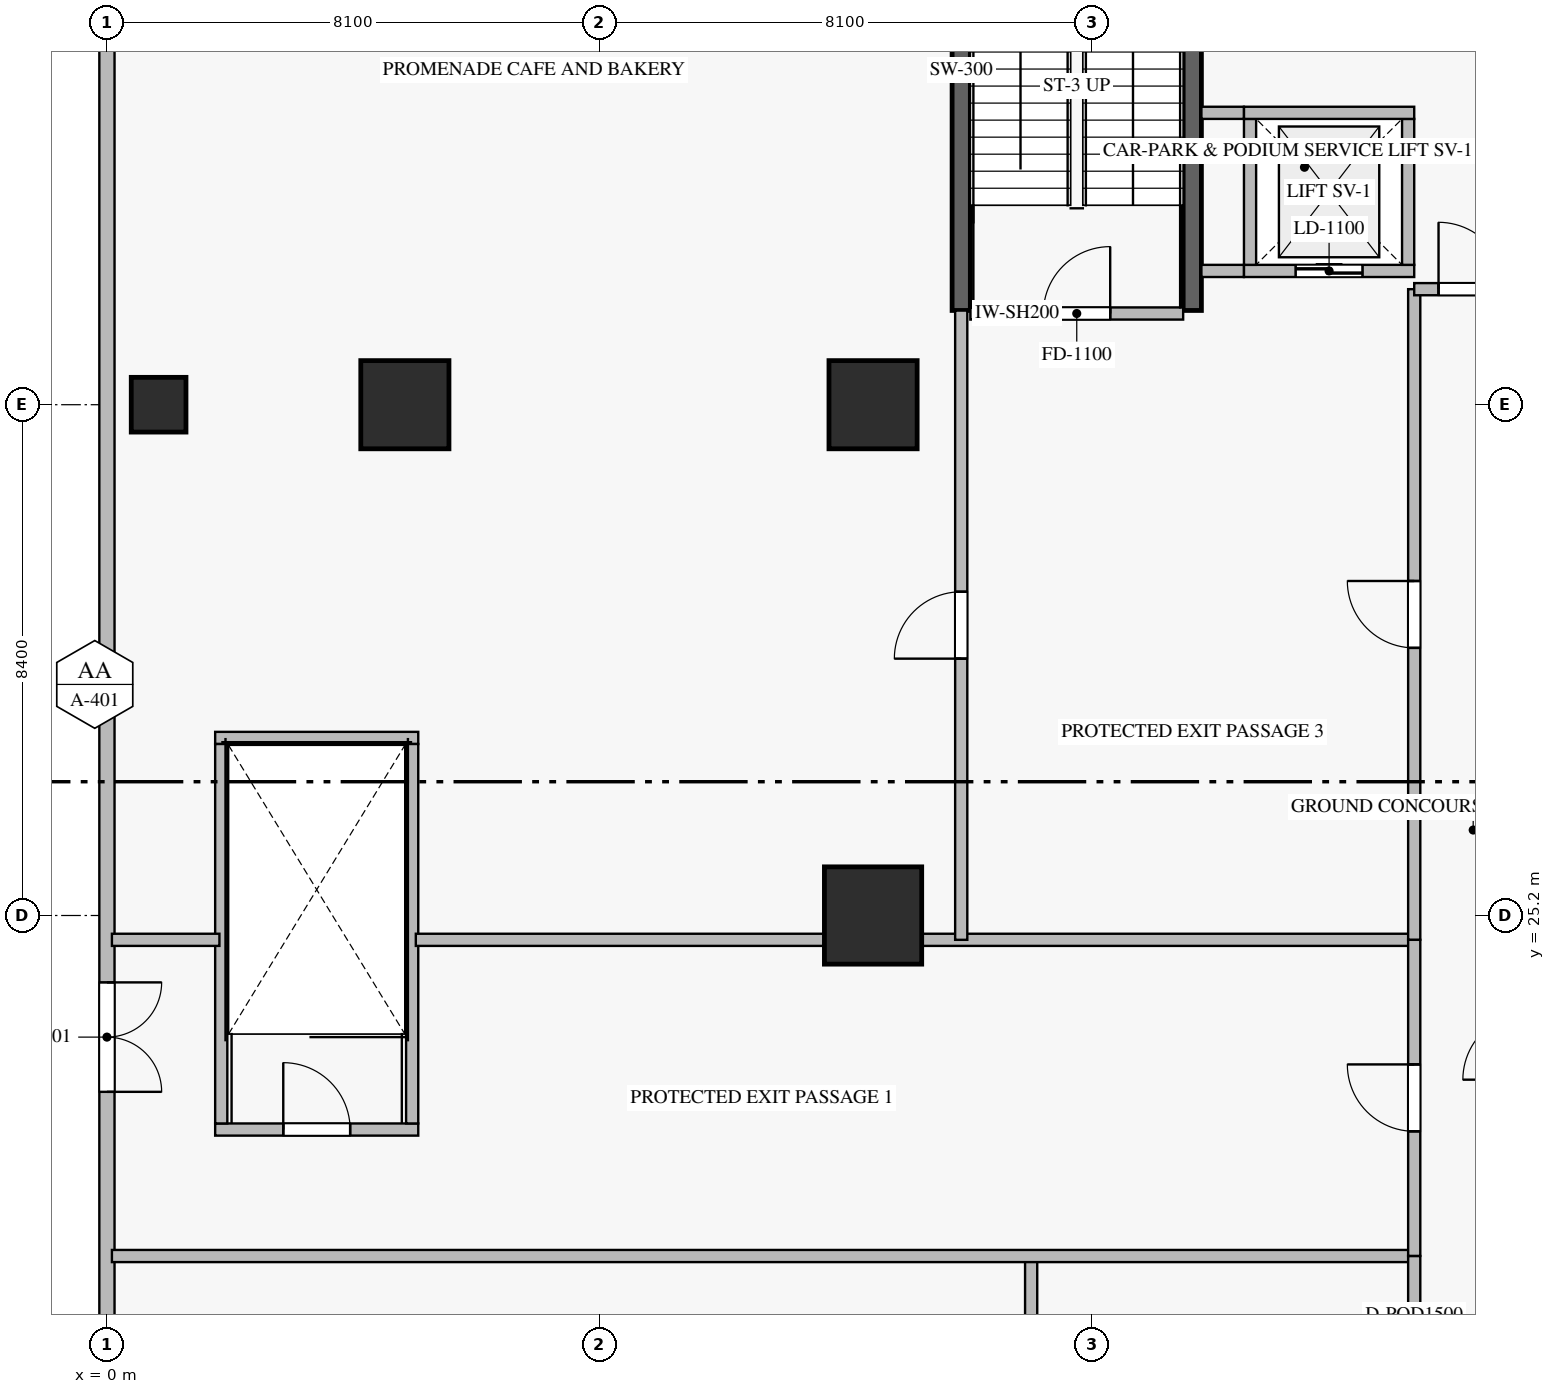
"""IFC4 building model, lengths in metres.
Left out: names, types, materials, properties, quantities, classifications, styles, units other than length and angle.
Written with IfcOpenShell. Run it as: python <this file> out.ifc"""

import sys

from ifc_helpers import new_model, si_unit, direction, frame, frame_2d, origin, origin_2d, place, context, subcontext, project, spatial, rectangle, extrude, source, transform, mapped, element, fill, save


model = new_model("IFC4")
c1 = context("Model", 3, precision=1e-05, world=origin(), true_north=direction((0.0, 1.0)))
c2 = subcontext(c1, "Body", "Model", "MODEL_VIEW")
j1 = project(units=[si_unit("LENGTHUNIT", "METRE"), si_unit("PLANEANGLEUNIT", "RADIAN")], contexts=[c1])
p1 = place(None, origin())
s1 = spatial("IfcSite", under=j1, at=p1, CompositionType="ELEMENT")
p2 = place(p1, origin())
s2 = spatial("IfcBuilding", under=s1, at=p2, CompositionType="ELEMENT")
p3 = place(p2, origin())
s3 = spatial("IfcBuildingStorey", under=s2, at=p3, CompositionType="ELEMENT", Elevation=0.0)
m1 = source(origin(), c2, "Body", "SweptSolid", [
    extrude(rectangle(XDim=0.9, YDim=0.9, at=origin_2d()), origin(), (0.0, 0.0, 1.0), 5.5),
])
p4 = place(p3, frame((0.85, 33.6, -0.38), z_axis=(0.0, 0.0, 1.0), x_axis=(1.0, 0.0, 0.0)))
e1 = element("IfcColumn", 1, at=p4, inside=s3, PredefinedType="COLUMN", context=c2, shape_type="MappedRepresentation", body=[
    mapped(m1, transform((0.0, 0.0, 0.0), scale=1.0)),
])
m2 = source(origin(), c2, "Body", "SweptSolid", [
    extrude(rectangle(XDim=1.6, YDim=1.6, at=origin_2d()), origin(), (0.0, 0.0, 1.0), 5.5),
])
p5 = place(p3, frame((12.6, 25.2, -0.38), z_axis=(0.0, 0.0, 1.0), x_axis=(1.0, 0.0, 0.0)))
e2 = element("IfcColumn", 2, at=p5, inside=s3, PredefinedType="COLUMN", context=c2, shape_type="MappedRepresentation", body=[
    mapped(m2, transform((0.0, 0.0, 0.0), scale=1.0)),
])
m3 = source(origin(), c2, "Body", "SweptSolid", [
    extrude(rectangle(XDim=1.45, YDim=1.45, at=origin_2d()), origin(), (0.0, 0.0, 1.0), 5.5),
])
for number, where, z_axis, x_axis in (
    (3, (12.6, 33.6, -0.38), (0.0, 0.0, 1.0), (1.0, 0.0, 0.0)),
    (4, (4.9, 33.6, -0.38), (0.0, 0.0, 1.0), (1.0, 0.0, 0.0)),
):
    element("IfcColumn", number, at=place(p3, frame(where, z_axis=z_axis, x_axis=x_axis)), inside=s3, PredefinedType="COLUMN", context=c2, shape_type="MappedRepresentation", body=[
        mapped(m3, transform((0.0, 0.0, 0.0), scale=1.0)),
    ])
p6 = place(p3, frame((0.0, 46.075, 0.0), z_axis=(0.0, 0.0, 1.0), x_axis=(0.0, -1.0, 0.0)))
e5 = element("IfcWall", 5, at=p6, inside=s3, PredefinedType="ELEMENTEDWALL", context=c2, shape_type="SweptSolid", body=[
    extrude(rectangle(XDim=41.75, YDim=0.25, at=frame_2d((20.875, 0.0))), origin(), (0.0, 0.0, 1.0), 5.105),
])
p7 = place(p6, frame((21.975, 0.0, 0.0)))
e6 = element("IfcOpeningElement", 6, at=p7, cuts=e5, PredefinedType="OPENING", context=c2, shape_type="SweptSolid", body=[
    extrude(rectangle(XDim=1.8, YDim=2.3, at=frame_2d((0.9, 1.15))), frame((0.0, 0.135, 0.0), z_axis=(0.0, -1.0, 0.0), x_axis=(1.0, 0.0, 0.0)), (0.0, 0.0, 1.0), 0.27),
])
p8 = place(p6, frame((33.475, 0.0, 0.0)))
e7 = element("IfcOpeningElement", 7, at=p8, cuts=e5, PredefinedType="OPENING", context=c2, shape_type="SweptSolid", body=[
    extrude(rectangle(XDim=1.8, YDim=2.3, at=frame_2d((0.9, 1.15))), frame((0.0, 0.135, 0.0), z_axis=(0.0, -1.0, 0.0), x_axis=(1.0, 0.0, 0.0)), (0.0, 0.0, 1.0), 0.27),
])
for number, where, z_axis, x_axis in (
    (8, (14.05, 35.15, -0.38), (0.0, 0.0, 1.0), (0.0, 1.0, 0.0)),
    (9, (17.85, 35.15, -0.38), (0.0, 0.0, 1.0), (0.0, 1.0, 0.0)),
):
    element("IfcWall", number, at=place(p3, frame(where, z_axis=z_axis, x_axis=x_axis)), inside=s3, PredefinedType="SHEAR", context=c2, shape_type="SweptSolid", body=[
        extrude(rectangle(XDim=7.9, YDim=0.3, at=frame_2d((3.95, 0.0))), origin(), (0.0, 0.0, 1.0), 5.498),
    ])
p9 = place(p3, frame((14.2, 35.1, 0.0), z_axis=(0.0, 0.0, 1.0), x_axis=(1.0, 0.0, 0.0)))
e10 = element("IfcWall", 10, at=p9, inside=s3, PredefinedType="STANDARD", context=c2, shape_type="SweptSolid", body=[
    extrude(rectangle(XDim=3.5, YDim=0.2, at=frame_2d((1.75, 0.0))), origin(), (0.0, 0.0, 1.0), 5.12),
])
p10 = place(p9, frame((1.2, 0.0, 0.0)))
e11 = element("IfcOpeningElement", 11, at=p10, cuts=e10, PredefinedType="OPENING", context=c2, shape_type="SweptSolid", body=[
    extrude(rectangle(XDim=1.1, YDim=2.15, at=frame_2d((0.55, 1.075))), frame((0.0, 0.11, 0.0), z_axis=(0.0, -1.0, 0.0), x_axis=(1.0, 0.0, 0.0)), (0.0, 0.0, 1.0), 0.22),
])
p11 = place(p3, frame((1.78, 21.68, 0.0), z_axis=(0.0, 0.0, 1.0), x_axis=(1.0, 0.0, 0.0)))
e12 = element("IfcWall", 12, at=p11, inside=s3, PredefinedType="STANDARD", context=c2, shape_type="SweptSolid", body=[
    extrude(rectangle(XDim=3.34, YDim=0.2, at=frame_2d((1.67, 0.0))), origin(), (0.0, 0.0, 1.0), 5.12),
])
p12 = place(p11, frame((1.12, 0.0, 0.0)))
e13 = element("IfcOpeningElement", 13, at=p12, cuts=e12, PredefinedType="OPENING", context=c2, shape_type="SweptSolid", body=[
    extrude(rectangle(XDim=1.1, YDim=2.15, at=frame_2d((0.55, 1.075))), frame((0.0, 0.11, 0.0), z_axis=(0.0, -1.0, 0.0), x_axis=(1.0, 0.0, 0.0)), (0.0, 0.0, 1.0), 0.22),
])
p13 = place(p3, frame((1.78, 28.12, 0.0), z_axis=(0.0, 0.0, 1.0), x_axis=(1.0, 0.0, 0.0)))
e14 = element("IfcWall", 14, at=p13, inside=s3, PredefinedType="STANDARD", context=c2, shape_type="SweptSolid", body=[
    extrude(rectangle(XDim=3.34, YDim=0.2, at=frame_2d((1.67, 0.0))), origin(), (0.0, 0.0, 1.0), 5.12),
])
for number, where, z_axis, x_axis in (
    (15, (1.88, 21.78, 0.0), (0.0, 0.0, 1.0), (0.0, 1.0, 0.0)),
    (16, (5.02, 21.78, 0.0), (0.0, 0.0, 1.0), (0.0, 1.0, 0.0)),
):
    element("IfcWall", number, at=place(p3, frame(where, z_axis=z_axis, x_axis=x_axis)), inside=s3, PredefinedType="STANDARD", context=c2, shape_type="SweptSolid", body=[
        extrude(rectangle(XDim=6.24, YDim=0.2, at=frame_2d((3.12, 0.0))), origin(), (0.0, 0.0, 1.0), 5.12),
    ])
p14 = place(p3, frame((18.7, 35.8, 0.0), z_axis=(0.0, 0.0, 1.0), x_axis=(1.0, 0.0, 0.0)))
e17 = element("IfcWall", 17, at=p14, inside=s3, PredefinedType="STANDARD", context=c2, shape_type="SweptSolid", body=[
    extrude(rectangle(XDim=2.8, YDim=0.2, at=frame_2d((1.4, 0.0))), origin(), (0.0, 0.0, 1.0), 5.12),
])
p15 = place(p14, frame((0.85, 0.0, 0.0)))
e18 = element("IfcOpeningElement", 18, at=p15, cuts=e17, PredefinedType="OPENING", context=c2, shape_type="SweptSolid", body=[
    extrude(rectangle(XDim=1.1, YDim=2.2, at=frame_2d((0.55, 1.1))), frame((0.0, 0.11, 0.0), z_axis=(0.0, -1.0, 0.0), x_axis=(1.0, 0.0, 0.0)), (0.0, 0.0, 1.0), 0.22),
])
for number, where, z_axis, x_axis in (
    (19, (18.8, 35.9, 0.0), (0.0, 0.0, 1.0), (0.0, 1.0, 0.0)),
    (20, (21.4, 35.9, 0.0), (0.0, 0.0, 1.0), (0.0, 1.0, 0.0)),
):
    element("IfcWall", number, at=place(p3, frame(where, z_axis=z_axis, x_axis=x_axis)), inside=s3, PredefinedType="STANDARD", context=c2, shape_type="SweptSolid", body=[
        extrude(rectangle(XDim=2.4, YDim=0.2, at=frame_2d((1.2, 0.0))), origin(), (0.0, 0.0, 1.0), 5.12),
    ])
p16 = place(p3, frame((18.7, 38.4, 0.0), z_axis=(0.0, 0.0, 1.0), x_axis=(1.0, 0.0, 0.0)))
e21 = element("IfcWall", 21, at=p16, inside=s3, PredefinedType="STANDARD", context=c2, shape_type="SweptSolid", body=[
    extrude(rectangle(XDim=2.8, YDim=0.2, at=frame_2d((1.4, 0.0))), origin(), (0.0, 0.0, 1.0), 5.12),
])
p17 = place(p3, frame((15.2, 4.282, 0.0), z_axis=(0.0, 0.0, 1.0), x_axis=(0.0, 1.0, 0.0)))
e22 = element("IfcWall", 22, at=p17, inside=s3, PredefinedType="STANDARD", context=c2, shape_type="SweptSolid", body=[
    extrude(rectangle(XDim=15.318, YDim=0.2, at=frame_2d((7.659, 0.0))), origin(), (0.0, 0.0, 1.0), 5.12),
])
p18 = place(p17, frame((7.209, 0.0, 0.0)))
e23 = element("IfcOpeningElement", 23, at=p18, cuts=e22, PredefinedType="OPENING", context=c2, shape_type="SweptSolid", body=[
    extrude(rectangle(XDim=0.9, YDim=2.1, at=frame_2d((0.45, 1.05))), frame((0.0, 0.11, 0.0), z_axis=(0.0, -1.0, 0.0), x_axis=(1.0, 0.0, 0.0)), (0.0, 0.0, 1.0), 0.22),
])
p19 = place(p3, frame((0.082, 19.6, 0.0), z_axis=(0.0, 0.0, 1.0), x_axis=(1.0, 0.0, 0.0)))
e24 = element("IfcWall", 24, at=p19, inside=s3, PredefinedType="STANDARD", context=c2, shape_type="SweptSolid", body=[
    extrude(rectangle(XDim=21.418, YDim=0.2, at=frame_2d((10.709, 0.0))), origin(), (0.0, 0.0, 1.0), 5.12),
])
p20 = place(p3, frame((0.082, 24.8, 0.0), z_axis=(0.0, 0.0, 1.0), x_axis=(1.0, 0.0, 0.0)))
e25 = element("IfcWall", 25, at=p20, inside=s3, PredefinedType="STANDARD", context=c2, shape_type="SweptSolid", body=[
    extrude(rectangle(XDim=1.768, YDim=0.2, at=frame_2d((0.884, 0.0))), origin(), (0.0, 0.0, 1.0), 5.12),
])
p21 = place(p3, frame((5.08, 24.8, 0.0), z_axis=(0.0, 0.0, 1.0), x_axis=(1.0, 0.0, 0.0)))
e26 = element("IfcWall", 26, at=p21, inside=s3, PredefinedType="STANDARD", context=c2, shape_type="SweptSolid", body=[
    extrude(rectangle(XDim=16.42, YDim=0.2, at=frame_2d((8.21, 0.0))), origin(), (0.0, 0.0, 1.0), 5.12),
])
p22 = place(p3, frame((21.5, 14.902, 0.0), z_axis=(0.0, 0.0, 1.0), x_axis=(0.0, 1.0, 0.0)))
e27 = element("IfcWall", 27, at=p22, inside=s3, PredefinedType="STANDARD", context=c2, shape_type="SweptSolid", body=[
    extrude(rectangle(XDim=4.698, YDim=0.2, at=frame_2d((2.349, 0.0))), origin(), (0.0, 0.0, 1.0), 5.12),
])
p23 = place(p22, frame((1.599, 0.0, 0.0)))
e28 = element("IfcOpeningElement", 28, at=p23, cuts=e27, PredefinedType="OPENING", context=c2, shape_type="SweptSolid", body=[
    extrude(rectangle(XDim=1.5, YDim=2.25, at=frame_2d((0.75, 1.125))), frame((0.0, 0.11, 0.0), z_axis=(0.0, -1.0, 0.0), x_axis=(1.0, 0.0, 0.0)), (0.0, 0.0, 1.0), 0.22),
])
p24 = place(p3, frame((21.5, 19.602, 0.0), z_axis=(0.0, 0.0, 1.0), x_axis=(0.0, 1.0, 0.0)))
e29 = element("IfcWall", 29, at=p24, inside=s3, PredefinedType="STANDARD", context=c2, shape_type="SweptSolid", body=[
    extrude(rectangle(XDim=5.198, YDim=0.2, at=frame_2d((2.599, 0.0))), origin(), (0.0, 0.0, 1.0), 5.12),
])
p25 = place(p24, frame((2.049, 0.0, 0.0)))
e30 = element("IfcOpeningElement", 30, at=p25, cuts=e29, PredefinedType="OPENING", context=c2, shape_type="SweptSolid", body=[
    extrude(rectangle(XDim=1.1, YDim=2.15, at=frame_2d((0.55, 1.075))), frame((0.0, 0.11, 0.0), z_axis=(0.0, -1.0, 0.0), x_axis=(1.0, 0.0, 0.0)), (0.0, 0.0, 1.0), 0.22),
])
p26 = place(p3, frame((14.05, 24.8, 0.0), z_axis=(0.0, 0.0, 1.0), x_axis=(0.0, 1.0, 0.0)))
e31 = element("IfcWall", 31, at=p26, inside=s3, PredefinedType="STANDARD", context=c2, shape_type="SweptSolid", body=[
    extrude(rectangle(XDim=10.348, YDim=0.2, at=frame_2d((5.174, 0.0))), origin(), (0.0, 0.0, 1.0), 5.12),
])
p27 = place(p26, frame((4.624, 0.0, 0.0)))
e32 = element("IfcOpeningElement", 32, at=p27, cuts=e31, PredefinedType="OPENING", context=c2, shape_type="SweptSolid", body=[
    extrude(rectangle(XDim=1.1, YDim=2.15, at=frame_2d((0.55, 1.075))), frame((0.0, 0.11, 0.0), z_axis=(0.0, -1.0, 0.0), x_axis=(1.0, 0.0, 0.0)), (0.0, 0.0, 1.0), 0.22),
])
p28 = place(p3, frame((21.5, 24.802, 0.0), z_axis=(0.0, 0.0, 1.0), x_axis=(0.0, 1.0, 0.0)))
e33 = element("IfcWall", 33, at=p28, inside=s3, PredefinedType="STANDARD", context=c2, shape_type="SweptSolid", body=[
    extrude(rectangle(XDim=10.698, YDim=0.2, at=frame_2d((5.349, 0.0))), origin(), (0.0, 0.0, 1.0), 5.12),
])
p29 = place(p28, frame((4.799, 0.0, 0.0)))
e34 = element("IfcOpeningElement", 34, at=p29, cuts=e33, PredefinedType="OPENING", context=c2, shape_type="SweptSolid", body=[
    extrude(rectangle(XDim=1.1, YDim=2.15, at=frame_2d((0.55, 1.075))), frame((0.0, 0.11, 0.0), z_axis=(0.0, -1.0, 0.0), x_axis=(1.0, 0.0, 0.0)), (0.0, 0.0, 1.0), 0.22),
])
p30 = place(p3, frame((21.5, 35.5, 0.0), z_axis=(0.0, 0.0, 1.0), x_axis=(1.0, 0.0, 0.0)))
e35 = element("IfcWall", 35, at=p30, inside=s3, PredefinedType="STANDARD", context=c2, shape_type="SweptSolid", body=[
    extrude(rectangle(XDim=1.9, YDim=0.2, at=frame_2d((0.95, 0.0))), origin(), (0.0, 0.0, 1.0), 5.12),
])
p31 = place(p30, frame((0.4, 0.0, 0.0)))
e36 = element("IfcOpeningElement", 36, at=p31, cuts=e35, PredefinedType="OPENING", context=c2, shape_type="SweptSolid", body=[
    extrude(rectangle(XDim=1.1, YDim=2.15, at=frame_2d((0.55, 1.075))), frame((0.0, 0.11, 0.0), z_axis=(0.0, -1.0, 0.0), x_axis=(1.0, 0.0, 0.0)), (0.0, 0.0, 1.0), 0.22),
])
for number, where, z_axis, x_axis in (
    (37, (18.0, 35.8, 0.0), (0.0, 0.0, 1.0), (1.0, 0.0, 0.0)),
    (38, (18.0, 38.4, 0.0), (0.0, 0.0, 1.0), (1.0, 0.0, 0.0)),
):
    element("IfcWall", number, at=place(p3, frame(where, z_axis=z_axis, x_axis=x_axis)), inside=s3, PredefinedType="STANDARD", context=c2, shape_type="SweptSolid", body=[
        extrude(rectangle(XDim=0.698, YDim=0.2, at=frame_2d((0.349, 0.0))), origin(), (0.0, 0.0, 1.0), 5.12),
    ])
m4 = source(origin(), c2, "Body", "SweptSolid", [
    extrude(rectangle(XDim=1.8, YDim=2.3, at=frame_2d((0.9, 1.15))), frame((0.0, 0.025, 0.0), z_axis=(0.0, -1.0, 0.0), x_axis=(1.0, 0.0, 0.0)), (0.0, 0.0, 1.0), 0.05),
])
p32 = place(p7, frame((1.8, 0.0, 0.0), z_axis=(0.0, 0.0, 1.0), x_axis=(-1.0, 0.0, 0.0)))
e39 = element("IfcDoor", 39, at=p32, inside=s3, OperationType="DOUBLE_DOOR_SINGLE_SWING", PredefinedType="DOOR", context=c2, shape_type="MappedRepresentation", body=[
    mapped(m4, transform((0.0, 0.0, 0.0), scale=1.0)),
])
fill(e6, e39)
m5 = source(origin(), c2, "Body", "SweptSolid", [
    extrude(rectangle(XDim=1.1, YDim=2.15, at=frame_2d((0.55, 1.075))), frame((0.0, 0.025, 0.0), z_axis=(0.0, -1.0, 0.0), x_axis=(1.0, 0.0, 0.0)), (0.0, 0.0, 1.0), 0.05),
])
p33 = place(p10, origin())
e40 = element("IfcDoor", 40, at=p33, inside=s3, OperationType="SINGLE_SWING_RIGHT", PredefinedType="DOOR", context=c2, shape_type="MappedRepresentation", body=[
    mapped(m5, transform((0.0, 0.0, 0.0), scale=1.0)),
])
fill(e11, e40)
p34 = place(p12, origin())
e41 = element("IfcDoor", 41, at=p34, inside=s3, OperationType="SINGLE_SWING_LEFT", PredefinedType="DOOR", context=c2, shape_type="MappedRepresentation", body=[
    mapped(m5, transform((0.0, 0.0, 0.0), scale=1.0)),
])
fill(e13, e41)
m6 = source(origin(), c2, "Body", "SweptSolid", [
    extrude(rectangle(XDim=1.1, YDim=2.2, at=frame_2d((0.55, 1.1))), frame((0.0, 0.025, 0.0), z_axis=(0.0, -1.0, 0.0), x_axis=(1.0, 0.0, 0.0)), (0.0, 0.0, 1.0), 0.05),
])
p35 = place(p15, origin())
e42 = element("IfcDoor", 42, at=p35, inside=s3, OperationType="DOUBLE_DOOR_SLIDING", PredefinedType="DOOR", context=c2, shape_type="MappedRepresentation", body=[
    mapped(m6, transform((0.0, 0.0, 0.0), scale=1.0)),
])
fill(e18, e42)
p36 = place(p25, origin())
e43 = element("IfcDoor", 43, at=p36, inside=s3, OperationType="SINGLE_SWING_RIGHT", PredefinedType="DOOR", context=c2, shape_type="MappedRepresentation", body=[
    mapped(m5, transform((0.0, 0.0, 0.0), scale=1.0)),
])
fill(e30, e43)
p37 = place(p27, origin())
e44 = element("IfcDoor", 44, at=p37, inside=s3, OperationType="SINGLE_SWING_LEFT", PredefinedType="DOOR", context=c2, shape_type="MappedRepresentation", body=[
    mapped(m5, transform((0.0, 0.0, 0.0), scale=1.0)),
])
fill(e32, e44)
p38 = place(p29, origin())
e45 = element("IfcDoor", 45, at=p38, inside=s3, OperationType="SINGLE_SWING_RIGHT", PredefinedType="DOOR", context=c2, shape_type="MappedRepresentation", body=[
    mapped(m5, transform((0.0, 0.0, 0.0), scale=1.0)),
])
fill(e34, e45)
p39 = place(p31, origin())
e46 = element("IfcDoor", 46, at=p39, inside=s3, OperationType="SINGLE_SWING_LEFT", PredefinedType="DOOR", context=c2, shape_type="MappedRepresentation", body=[
    mapped(m5, transform((0.0, 0.0, 0.0), scale=1.0)),
])
fill(e36, e46)
save(model, sys.argv[1])
